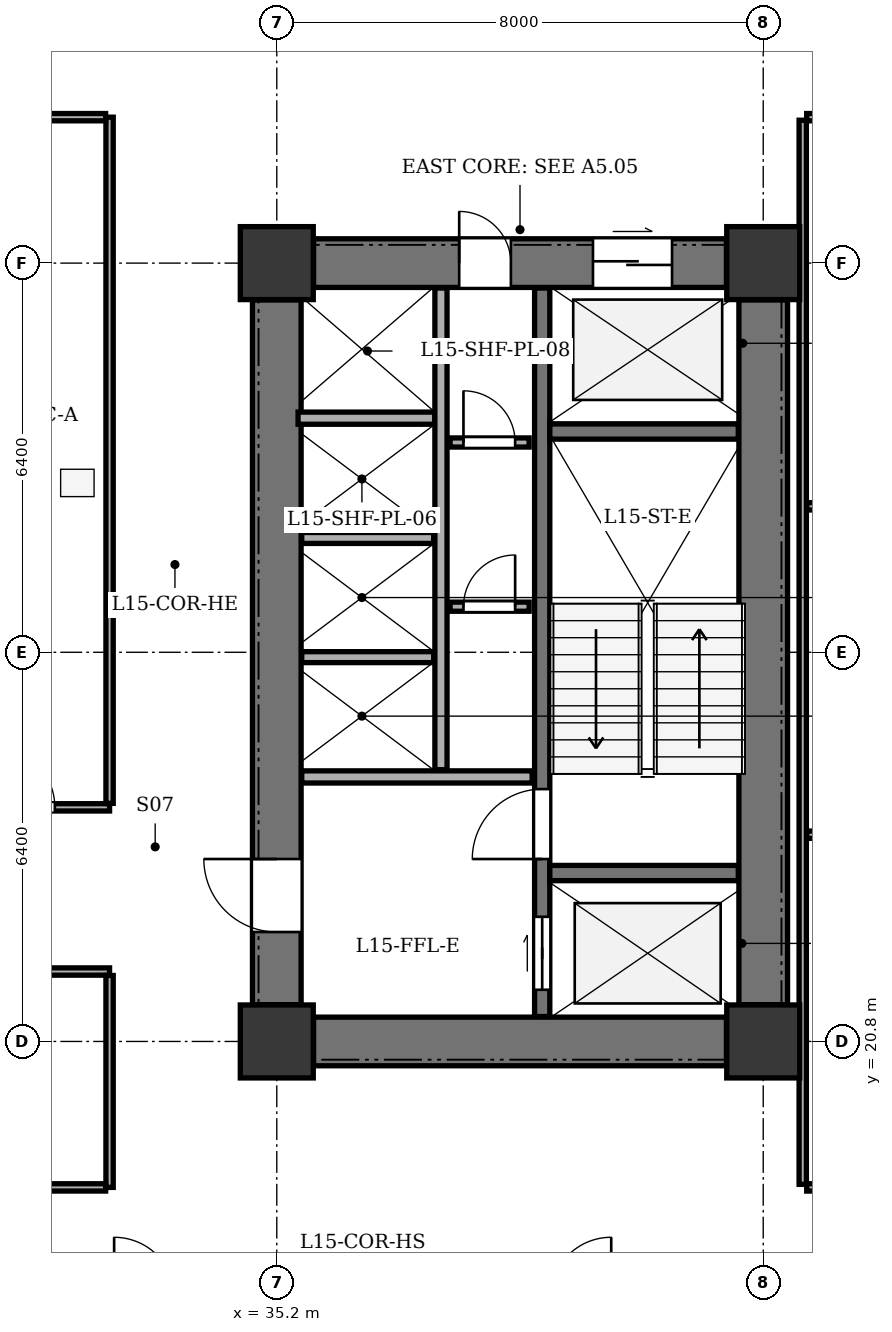
"""IFC4 building model, lengths in metres.
Left out: names, types, materials, properties, quantities, classifications, styles, units other than length and angle.
Written with IfcOpenShell. Run it as: python <this file> out.ifc"""

import sys

from ifc_helpers import new_model, si_unit, direction, frame, frame_2d, origin, origin_2d, place, context, subcontext, project, spatial, rectangle, extrude, element, fill, save


model = new_model("IFC4")
c1 = context("Model", 3, precision=1e-05, world=origin(), true_north=direction((0.0, 1.0)))
c2 = subcontext(c1, "Body", "Model", "MODEL_VIEW")
j1 = project(units=[si_unit("LENGTHUNIT", "METRE"), si_unit("PLANEANGLEUNIT", "RADIAN")], contexts=[c1])
p1 = place(None, origin())
s1 = spatial("IfcSite", under=j1, at=p1, CompositionType="ELEMENT")
p2 = place(p1, origin())
s2 = spatial("IfcBuilding", under=s1, at=p2, CompositionType="ELEMENT")
p3 = place(p2, frame((0.0, 0.0, 63.3)))
s3 = spatial("IfcBuildingStorey", under=s2, at=p3, CompositionType="ELEMENT", Elevation=63.3)
for number, where, z_axis, x_axis in (
    (1, (35.2, 20.8, 0.0), (0.0, 0.0, 1.0), (1.0, 0.0, 0.0)),
    (2, (43.2, 20.8, 0.0), (0.0, 0.0, 1.0), (1.0, 0.0, 0.0)),
    (3, (35.2, 33.6, 0.0), (0.0, 0.0, 1.0), (1.0, 0.0, 0.0)),
    (4, (43.2, 33.6, 0.0), (0.0, 0.0, 1.0), (1.0, 0.0, 0.0)),
):
    element("IfcColumn", number, at=place(p3, frame(where, z_axis=z_axis, x_axis=x_axis)), inside=s3, PredefinedType="COLUMN", context=c2, shape_type="SweptSolid", body=[
        extrude(rectangle(XDim=1.2, YDim=1.2, at=origin_2d()), origin(), (0.0, 0.0, 1.0), 3.9),
    ])
p4 = place(p3, frame((43.2, 21.405, 0.0), z_axis=(0.0, 0.0, 1.0), x_axis=(0.0, 1.0, 0.0)))
e5 = element("IfcWall", 5, at=p4, inside=s3, PredefinedType="SHEAR", context=c2, shape_type="SweptSolid", body=[
    extrude(rectangle(XDim=11.59, YDim=0.8, at=frame_2d((5.795, 0.0))), origin(), (0.0, 0.0, 1.0), 3.6),
])
p5 = place(p3, frame((35.805, 20.8, 0.0), z_axis=(0.0, 0.0, 1.0), x_axis=(1.0, 0.0, 0.0)))
e6 = element("IfcWall", 6, at=p5, inside=s3, PredefinedType="SHEAR", context=c2, shape_type="SweptSolid", body=[
    extrude(rectangle(XDim=6.79, YDim=0.8, at=frame_2d((3.395, 0.0))), origin(), (0.0, 0.0, 1.0), 3.6),
])
p6 = place(p3, frame((35.805, 33.6, 0.0), z_axis=(0.0, 0.0, 1.0), x_axis=(1.0, 0.0, 0.0)))
e7 = element("IfcWall", 7, at=p6, inside=s3, PredefinedType="SHEAR", context=c2, shape_type="SweptSolid", body=[
    extrude(rectangle(XDim=6.79, YDim=0.8, at=frame_2d((3.395, 0.0))), origin(), (0.0, 0.0, 1.0), 3.6),
])
p7 = place(p6, frame((4.595, 0.0, 0.0)))
e8 = element("IfcOpeningElement", 8, at=p7, cuts=e7, PredefinedType="OPENING", context=c2, shape_type="SweptSolid", body=[
    extrude(rectangle(XDim=1.3, YDim=2.15, at=frame_2d((0.65, 1.075))), frame((0.0, 0.41, 0.0), z_axis=(0.0, -1.0, 0.0), x_axis=(1.0, 0.0, 0.0)), (0.0, 0.0, 1.0), 0.82),
])
p8 = place(p6, frame((2.395, 0.0, 0.0)))
e9 = element("IfcOpeningElement", 9, at=p8, cuts=e7, PredefinedType="OPENING", context=c2, shape_type="SweptSolid", body=[
    extrude(rectangle(XDim=0.85, YDim=2.02, at=frame_2d((0.425, 1.01))), frame((0.0, 0.41, 0.0), z_axis=(0.0, -1.0, 0.0), x_axis=(1.0, 0.0, 0.0)), (0.0, 0.0, 1.0), 0.82),
])
p9 = place(p3, frame((35.2, 21.405, 0.0), z_axis=(0.0, 0.0, 1.0), x_axis=(0.0, 1.0, 0.0)))
e10 = element("IfcWall", 10, at=p9, inside=s3, PredefinedType="SHEAR", context=c2, shape_type="SweptSolid", body=[
    extrude(rectangle(XDim=11.59, YDim=0.8, at=frame_2d((5.795, 0.0))), origin(), (0.0, 0.0, 1.0), 3.6),
])
p10 = place(p9, frame((1.195, 0.0, 0.0)))
e11 = element("IfcOpeningElement", 11, at=p10, cuts=e10, PredefinedType="OPENING", context=c2, shape_type="SweptSolid", body=[
    extrude(rectangle(XDim=1.2, YDim=2.15, at=frame_2d((0.6, 1.075))), frame((0.0, 0.41, 0.0), z_axis=(0.0, -1.0, 0.0), x_axis=(1.0, 0.0, 0.0)), (0.0, 0.0, 1.0), 0.82),
])
p11 = place(p3, frame((39.565, 21.21, 0.0), z_axis=(0.0, 0.0, 1.0), x_axis=(0.0, 1.0, 0.0)))
e12 = element("IfcWall", 12, at=p11, inside=s3, PredefinedType="SHEAR", context=c2, shape_type="SweptSolid", body=[
    extrude(rectangle(XDim=11.98, YDim=0.25, at=frame_2d((5.99, 0.0))), origin(), (0.0, 0.0, 1.0), 3.6),
])
p12 = place(p11, frame((0.44, 0.0, 0.0)))
e13 = element("IfcOpeningElement", 13, at=p12, cuts=e12, PredefinedType="OPENING", context=c2, shape_type="SweptSolid", body=[
    extrude(rectangle(XDim=1.2, YDim=2.15, at=frame_2d((0.6, 1.075))), frame((0.0, 0.135, 0.0), z_axis=(0.0, -1.0, 0.0), x_axis=(1.0, 0.0, 0.0)), (0.0, 0.0, 1.0), 0.27),
])
p13 = place(p11, frame((2.59, 0.0, 0.0)))
e14 = element("IfcOpeningElement", 14, at=p13, cuts=e12, PredefinedType="OPENING", context=c2, shape_type="SweptSolid", body=[
    extrude(rectangle(XDim=1.15, YDim=2.15, at=frame_2d((0.575, 1.075))), frame((0.0, 0.135, 0.0), z_axis=(0.0, -1.0, 0.0), x_axis=(1.0, 0.0, 0.0)), (0.0, 0.0, 1.0), 0.27),
])
for number, where, z_axis, x_axis in (
    (15, (39.69, 23.57, 0.0), (0.0, 0.0, 1.0), (1.0, 0.0, 0.0)),
    (16, (39.69, 30.83, 0.0), (0.0, 0.0, 1.0), (1.0, 0.0, 0.0)),
):
    element("IfcWall", number, at=place(p3, frame(where, z_axis=z_axis, x_axis=x_axis)), inside=s3, PredefinedType="SHEAR", context=c2, shape_type="SweptSolid", body=[
        extrude(rectangle(XDim=3.1, YDim=0.25, at=frame_2d((1.55, 0.0))), origin(), (0.0, 0.0, 1.0), 3.6),
    ])
p14 = place(p3, frame((35.61, 25.15, 0.0), z_axis=(0.0, 0.0, 1.0), x_axis=(1.0, 0.0, 0.0)))
e17 = element("IfcWall", 17, at=p14, inside=s3, PredefinedType="SOLIDWALL", context=c2, shape_type="SweptSolid", body=[
    extrude(rectangle(XDim=3.79, YDim=0.2, at=frame_2d((1.895, 0.0))), origin(), (0.0, 0.0, 1.0), 3.6),
])
p15 = place(p3, frame((35.55, 31.05, 0.0), z_axis=(0.0, 0.0, 1.0), x_axis=(1.0, 0.0, 0.0)))
e18 = element("IfcWall", 18, at=p15, inside=s3, PredefinedType="SOLIDWALL", context=c2, shape_type="SweptSolid", body=[
    extrude(rectangle(XDim=2.25, YDim=0.2, at=frame_2d((1.125, 0.0))), origin(), (0.0, 0.0, 1.0), 3.6),
])
p16 = place(p3, frame((37.9, 25.27, 0.0), z_axis=(0.0, 0.0, 1.0), x_axis=(0.0, 1.0, 0.0)))
e19 = element("IfcWall", 19, at=p16, inside=s3, PredefinedType="SOLIDWALL", context=c2, shape_type="SweptSolid", body=[
    extrude(rectangle(XDim=7.92, YDim=0.2, at=frame_2d((3.96, 0.0))), origin(), (0.0, 0.0, 1.0), 3.6),
])
for number, where, z_axis, x_axis in (
    (20, (35.61, 27.12, 0.0), (0.0, 0.0, 1.0), (1.0, 0.0, 0.0)),
    (21, (35.61, 29.08, 0.0), (0.0, 0.0, 1.0), (1.0, 0.0, 0.0)),
):
    element("IfcWall", number, at=place(p3, frame(where, z_axis=z_axis, x_axis=x_axis)), inside=s3, PredefinedType="PARTITIONING", context=c2, shape_type="SweptSolid", body=[
        extrude(rectangle(XDim=2.17, YDim=0.18, at=frame_2d((1.085, 0.0))), origin(), (0.0, 0.0, 1.0), 3.6),
    ])
p17 = place(p3, frame((38.05, 27.95, 0.0), z_axis=(0.0, 0.0, 1.0), x_axis=(1.0, 0.0, 0.0)))
e22 = element("IfcWall", 22, at=p17, inside=s3, PredefinedType="PARTITIONING", context=c2, shape_type="SweptSolid", body=[
    extrude(rectangle(XDim=1.3, YDim=0.15, at=frame_2d((0.65, 0.0))), origin(), (0.0, 0.0, 1.0), 3.6),
])
p18 = place(p17, frame((0.22, 0.0, 0.0)))
e23 = element("IfcOpeningElement", 23, at=p18, cuts=e22, PredefinedType="OPENING", context=c2, shape_type="SweptSolid", body=[
    extrude(rectangle(XDim=0.85, YDim=2.02, at=frame_2d((0.425, 1.01))), frame((0.0, 0.085, 0.0), z_axis=(0.0, -1.0, 0.0), x_axis=(1.0, 0.0, 0.0)), (0.0, 0.0, 1.0), 0.17),
])
p19 = place(p3, frame((38.05, 30.65, 0.0), z_axis=(0.0, 0.0, 1.0), x_axis=(1.0, 0.0, 0.0)))
e24 = element("IfcWall", 24, at=p19, inside=s3, PredefinedType="PARTITIONING", context=c2, shape_type="SweptSolid", body=[
    extrude(rectangle(XDim=1.3, YDim=0.15, at=frame_2d((0.65, 0.0))), origin(), (0.0, 0.0, 1.0), 3.6),
])
p20 = place(p19, frame((0.22, 0.0, 0.0)))
e25 = element("IfcOpeningElement", 25, at=p20, cuts=e24, PredefinedType="OPENING", context=c2, shape_type="SweptSolid", body=[
    extrude(rectangle(XDim=0.85, YDim=2.02, at=frame_2d((0.425, 1.01))), frame((0.0, 0.085, 0.0), z_axis=(0.0, -1.0, 0.0), x_axis=(1.0, 0.0, 0.0)), (0.0, 0.0, 1.0), 0.17),
])
p21 = place(p3, frame((23.55, 24.65, 0.0), z_axis=(0.0, 0.0, 1.0), x_axis=(1.0, 0.0, 0.0)))
e26 = element("IfcWall", 26, at=p21, inside=s3, PredefinedType="PARTITIONING", context=c2, shape_type="SweptSolid", body=[
    extrude(rectangle(XDim=8.9, YDim=0.12, at=frame_2d((4.45, 0.0))), origin(), (0.0, 0.0, 1.0), 3.135),
])
p22 = place(p21, frame((1.0, 0.0, 0.0)))
e27 = element("IfcOpeningElement", 27, at=p22, cuts=e26, PredefinedType="OPENING", context=c2, shape_type="SweptSolid", body=[
    extrude(rectangle(XDim=0.95, YDim=2.1, at=frame_2d((0.475, 1.05))), frame((0.0, 0.07, 0.0), z_axis=(0.0, -1.0, 0.0), x_axis=(1.0, 0.0, 0.0)), (0.0, 0.0, 1.0), 0.14),
])
p23 = place(p21, frame((4.1, 0.0, 0.0)))
e28 = element("IfcOpeningElement", 28, at=p23, cuts=e26, PredefinedType="OPENING", context=c2, shape_type="SweptSolid", body=[
    extrude(rectangle(XDim=0.95, YDim=2.1, at=frame_2d((0.475, 1.05))), frame((0.0, 0.07, 0.0), z_axis=(0.0, -1.0, 0.0), x_axis=(1.0, 0.0, 0.0)), (0.0, 0.0, 1.0), 0.14),
])
p24 = place(p21, frame((7.0, 0.0, 0.0)))
e29 = element("IfcOpeningElement", 29, at=p24, cuts=e26, PredefinedType="OPENING", context=c2, shape_type="SweptSolid", body=[
    extrude(rectangle(XDim=1.0, YDim=2.1, at=frame_2d((0.5, 1.05))), frame((0.0, 0.07, 0.0), z_axis=(0.0, -1.0, 0.0), x_axis=(1.0, 0.0, 0.0)), (0.0, 0.0, 1.0), 0.14),
])
p25 = place(p3, frame((32.45, 24.715, 0.0), z_axis=(0.0, 0.0, 1.0), x_axis=(0.0, 1.0, 0.0)))
e30 = element("IfcWall", 30, at=p25, inside=s3, PredefinedType="PARTITIONING", context=c2, shape_type="SweptSolid", body=[
    extrude(rectangle(XDim=11.285, YDim=0.12, at=frame_2d((5.643, 0.0))), origin(), (0.0, 0.0, 1.0), 3.6),
])
p26 = place(p3, frame((23.615, 36.0, 0.0), z_axis=(0.0, 0.0, 1.0), x_axis=(1.0, 0.0, 0.0)))
e31 = element("IfcWall", 31, at=p26, inside=s3, PredefinedType="PARTITIONING", context=c2, shape_type="SweptSolid", body=[
    extrude(rectangle(XDim=8.77, YDim=0.12, at=frame_2d((4.385, 0.0))), origin(), (0.0, 0.0, 1.0), 3.6),
])
p27 = place(p3, frame((23.55, 21.95, 0.0), z_axis=(0.0, 0.0, 1.0), x_axis=(1.0, 0.0, 0.0)))
e32 = element("IfcWall", 32, at=p27, inside=s3, PredefinedType="PARTITIONING", context=c2, shape_type="SweptSolid", body=[
    extrude(rectangle(XDim=8.9, YDim=0.12, at=frame_2d((4.45, 0.0))), origin(), (0.0, 0.0, 1.0), 3.135),
])
p28 = place(p27, frame((3.6, 0.0, 0.0)))
e33 = element("IfcOpeningElement", 33, at=p28, cuts=e32, PredefinedType="OPENING", context=c2, shape_type="SweptSolid", body=[
    extrude(rectangle(XDim=1.1, YDim=2.15, at=frame_2d((0.55, 1.075))), frame((0.0, 0.07, 0.0), z_axis=(0.0, -1.0, 0.0), x_axis=(1.0, 0.0, 0.0)), (0.0, 0.0, 1.0), 0.14),
])
p29 = place(p3, frame((32.45, 18.4, 0.0), z_axis=(0.0, 0.0, 1.0), x_axis=(0.0, 1.0, 0.0)))
e34 = element("IfcWall", 34, at=p29, inside=s3, PredefinedType="PARTITIONING", context=c2, shape_type="SweptSolid", body=[
    extrude(rectangle(XDim=3.485, YDim=0.12, at=frame_2d((1.743, 0.0))), origin(), (0.0, 0.0, 1.0), 3.6),
])
p30 = place(p3, frame((23.615, 18.4, 0.0), z_axis=(0.0, 0.0, 1.0), x_axis=(1.0, 0.0, 0.0)))
e35 = element("IfcWall", 35, at=p30, inside=s3, PredefinedType="PARTITIONING", context=c2, shape_type="SweptSolid", body=[
    extrude(rectangle(XDim=8.77, YDim=0.12, at=frame_2d((4.385, 0.0))), origin(), (0.0, 0.0, 1.0), 3.6),
])
p31 = place(p3, frame((43.85, 18.45, 0.0), z_axis=(0.0, 0.0, 1.0), x_axis=(0.0, 1.0, 0.0)))
e36 = element("IfcWall", 36, at=p31, inside=s3, PredefinedType="PARTITIONING", context=c2, shape_type="SweptSolid", body=[
    extrude(rectangle(XDim=17.5, YDim=0.12, at=frame_2d((8.75, 0.0))), origin(), (0.0, 0.0, 1.0), 3.6),
])
p32 = place(p3, frame((43.915, 18.4, 0.0), z_axis=(0.0, 0.0, 1.0), x_axis=(1.0, 0.0, 0.0)))
e37 = element("IfcWall", 37, at=p32, inside=s3, PredefinedType="PARTITIONING", context=c2, shape_type="SweptSolid", body=[
    extrude(rectangle(XDim=11.38, YDim=0.12, at=frame_2d((5.69, 0.0))), origin(), (0.0, 0.0, 1.0), 3.6),
])
p33 = place(p32, frame((1.485, 0.0, 0.0)))
e38 = element("IfcOpeningElement", 38, at=p33, cuts=e37, PredefinedType="OPENING", context=c2, shape_type="SweptSolid", body=[
    extrude(rectangle(XDim=0.95, YDim=2.1, at=frame_2d((0.475, 1.05))), frame((0.0, 0.07, 0.0), z_axis=(0.0, -1.0, 0.0), x_axis=(1.0, 0.0, 0.0)), (0.0, 0.0, 1.0), 0.14),
])
p34 = place(p3, frame((43.915, 36.0, 0.0), z_axis=(0.0, 0.0, 1.0), x_axis=(1.0, 0.0, 0.0)))
e39 = element("IfcWall", 39, at=p34, inside=s3, PredefinedType="PARTITIONING", context=c2, shape_type="SweptSolid", body=[
    extrude(rectangle(XDim=11.38, YDim=0.12, at=frame_2d((5.69, 0.0))), origin(), (0.0, 0.0, 1.0), 3.6),
])
p35 = place(p34, frame((1.485, 0.0, 0.0)))
e40 = element("IfcOpeningElement", 40, at=p35, cuts=e39, PredefinedType="OPENING", context=c2, shape_type="SweptSolid", body=[
    extrude(rectangle(XDim=0.95, YDim=2.1, at=frame_2d((0.475, 1.05))), frame((0.0, 0.07, 0.0), z_axis=(0.0, -1.0, 0.0), x_axis=(1.0, 0.0, 0.0)), (0.0, 0.0, 1.0), 0.14),
])
p36 = place(p3, frame((43.915, 24.2, 0.0), z_axis=(0.0, 0.0, 1.0), x_axis=(1.0, 0.0, 0.0)))
e41 = element("IfcWall", 41, at=p36, inside=s3, PredefinedType="PARTITIONING", context=c2, shape_type="SweptSolid", body=[
    extrude(rectangle(XDim=11.38, YDim=0.12, at=frame_2d((5.69, 0.0))), origin(), (0.0, 0.0, 1.0), 3.6),
])
p37 = place(p36, frame((1.985, 0.0, 0.0)))
e42 = element("IfcOpeningElement", 42, at=p37, cuts=e41, PredefinedType="OPENING", context=c2, shape_type="SweptSolid", body=[
    extrude(rectangle(XDim=0.9, YDim=2.05, at=frame_2d((0.45, 1.025))), frame((0.0, 0.07, 0.0), z_axis=(0.0, -1.0, 0.0), x_axis=(1.0, 0.0, 0.0)), (0.0, 0.0, 1.0), 0.14),
])
p38 = place(p3, frame((43.915, 29.6, 0.0), z_axis=(0.0, 0.0, 1.0), x_axis=(1.0, 0.0, 0.0)))
e43 = element("IfcWall", 43, at=p38, inside=s3, PredefinedType="PARTITIONING", context=c2, shape_type="SweptSolid", body=[
    extrude(rectangle(XDim=11.38, YDim=0.12, at=frame_2d((5.69, 0.0))), origin(), (0.0, 0.0, 1.0), 3.6),
])
p39 = place(p38, frame((1.985, 0.0, 0.0)))
e44 = element("IfcOpeningElement", 44, at=p39, cuts=e43, PredefinedType="OPENING", context=c2, shape_type="SweptSolid", body=[
    extrude(rectangle(XDim=0.9, YDim=2.05, at=frame_2d((0.45, 1.025))), frame((0.0, 0.07, 0.0), z_axis=(0.0, -1.0, 0.0), x_axis=(1.0, 0.0, 0.0)), (0.0, 0.0, 1.0), 0.14),
])
p40 = place(p7, origin())
e45 = element("IfcDoor", 45, at=p40, inside=s3, OperationType="DOUBLE_DOOR_SLIDING", PredefinedType="DOOR", context=c2, shape_type="SweptSolid", body=[
    extrude(rectangle(XDim=1.3, YDim=2.15, at=frame_2d((0.65, 1.075))), frame((0.0, 0.025, 0.0), z_axis=(0.0, -1.0, 0.0), x_axis=(1.0, 0.0, 0.0)), (0.0, 0.0, 1.0), 0.05),
])
fill(e8, e45)
p41 = place(p8, origin())
e46 = element("IfcDoor", 46, at=p41, inside=s3, OperationType="SINGLE_SWING_LEFT", PredefinedType="DOOR", context=c2, shape_type="SweptSolid", body=[
    extrude(rectangle(XDim=0.85, YDim=2.02, at=frame_2d((0.425, 1.01))), frame((0.0, 0.025, 0.0), z_axis=(0.0, -1.0, 0.0), x_axis=(1.0, 0.0, 0.0)), (0.0, 0.0, 1.0), 0.05),
])
fill(e9, e46)
p42 = place(p10, origin())
e47 = element("IfcDoor", 47, at=p42, inside=s3, OperationType="SINGLE_SWING_RIGHT", PredefinedType="DOOR", context=c2, shape_type="SweptSolid", body=[
    extrude(rectangle(XDim=1.2, YDim=2.15, at=frame_2d((0.6, 1.075))), frame((0.0, 0.025, 0.0), z_axis=(0.0, -1.0, 0.0), x_axis=(1.0, 0.0, 0.0)), (0.0, 0.0, 1.0), 0.05),
])
fill(e11, e47)
p43 = place(p12, origin())
e48 = element("IfcDoor", 48, at=p43, inside=s3, OperationType="DOUBLE_DOOR_SLIDING", PredefinedType="DOOR", context=c2, shape_type="SweptSolid", body=[
    extrude(rectangle(XDim=1.2, YDim=2.15, at=frame_2d((0.6, 1.075))), frame((0.0, 0.025, 0.0), z_axis=(0.0, -1.0, 0.0), x_axis=(1.0, 0.0, 0.0)), (0.0, 0.0, 1.0), 0.05),
])
fill(e13, e48)
p44 = place(p13, origin())
e49 = element("IfcDoor", 49, at=p44, inside=s3, OperationType="SINGLE_SWING_LEFT", PredefinedType="DOOR", context=c2, shape_type="SweptSolid", body=[
    extrude(rectangle(XDim=1.15, YDim=2.15, at=frame_2d((0.575, 1.075))), frame((0.0, 0.025, 0.0), z_axis=(0.0, -1.0, 0.0), x_axis=(1.0, 0.0, 0.0)), (0.0, 0.0, 1.0), 0.05),
])
fill(e14, e49)
p45 = place(p18, origin())
e50 = element("IfcDoor", 50, at=p45, inside=s3, OperationType="SINGLE_SWING_RIGHT", PredefinedType="DOOR", context=c2, shape_type="SweptSolid", body=[
    extrude(rectangle(XDim=0.85, YDim=2.02, at=frame_2d((0.425, 1.01))), frame((0.0, 0.025, 0.0), z_axis=(0.0, -1.0, 0.0), x_axis=(1.0, 0.0, 0.0)), (0.0, 0.0, 1.0), 0.05),
])
fill(e23, e50)
p46 = place(p20, origin())
e51 = element("IfcDoor", 51, at=p46, inside=s3, OperationType="SINGLE_SWING_LEFT", PredefinedType="DOOR", context=c2, shape_type="SweptSolid", body=[
    extrude(rectangle(XDim=0.85, YDim=2.02, at=frame_2d((0.425, 1.01))), frame((0.0, 0.025, 0.0), z_axis=(0.0, -1.0, 0.0), x_axis=(1.0, 0.0, 0.0)), (0.0, 0.0, 1.0), 0.05),
])
fill(e25, e51)
p47 = place(p24, origin())
e52 = element("IfcDoor", 52, at=p47, inside=s3, OperationType="SINGLE_SWING_LEFT", PredefinedType="DOOR", context=c2, shape_type="SweptSolid", body=[
    extrude(rectangle(XDim=1.0, YDim=2.1, at=frame_2d((0.5, 1.05))), frame((0.0, 0.025, 0.0), z_axis=(0.0, -1.0, 0.0), x_axis=(1.0, 0.0, 0.0)), (0.0, 0.0, 1.0), 0.05),
])
fill(e29, e52)
save(model, sys.argv[1])
